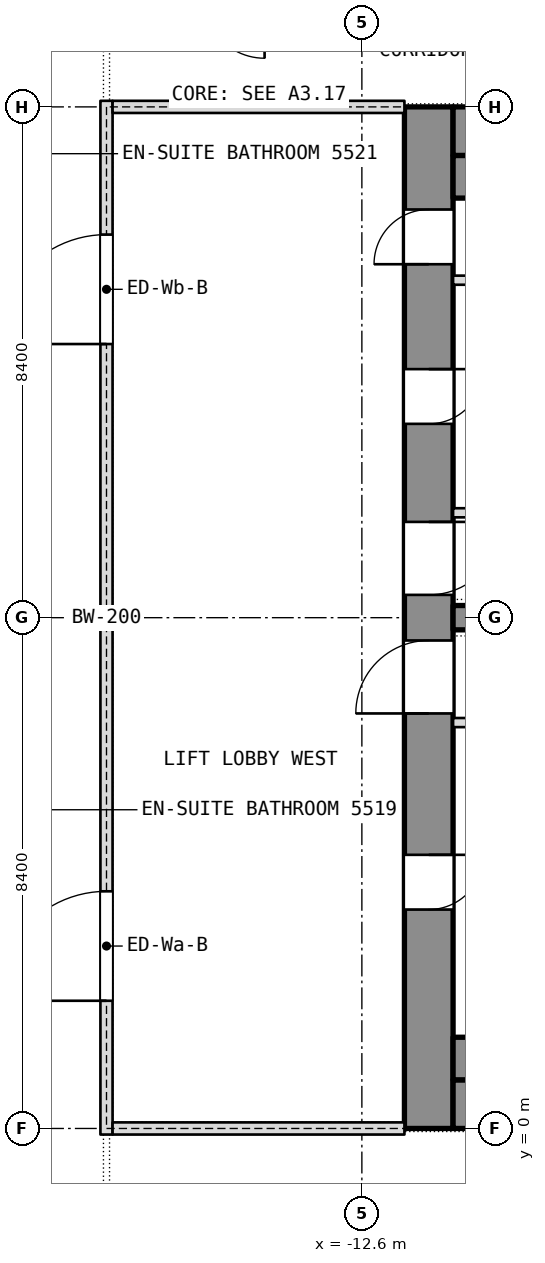
"""IFC4 building model, lengths in metres.
Left out: names, types, materials, properties, quantities, classifications, styles, units other than length and angle.
Written with IfcOpenShell. Run it as: python <this file> out.ifc"""

import sys

from ifc_helpers import new_model, si_unit, direction, frame, frame_2d, origin, place, context, subcontext, project, spatial, rectangle, extrude, element, fill, save


model = new_model("IFC4")
c1 = context("Model", 3, precision=1e-05, world=origin(), true_north=direction((0.0, 1.0)))
c2 = subcontext(c1, "Body", "Model", "MODEL_VIEW")
j1 = project(units=[si_unit("LENGTHUNIT", "METRE"), si_unit("PLANEANGLEUNIT", "RADIAN")], contexts=[c1])
p1 = place(None, origin())
s1 = spatial("IfcSite", under=j1, at=p1, CompositionType="ELEMENT")
p2 = place(p1, origin())
s2 = spatial("IfcBuilding", under=s1, at=p2, CompositionType="ELEMENT")
p3 = place(p2, frame((0.0, 0.0, 234.5)))
s3 = spatial("IfcBuildingStorey", under=s2, at=p3, CompositionType="ELEMENT", Elevation=234.5)
p4 = place(p3, frame((-11.5, 0.0, 0.0), z_axis=(0.0, 0.0, 1.0), x_axis=(0.0, 1.0, 0.0)))
e1 = element("IfcWall", 1, at=p4, inside=s3, PredefinedType="SHEAR", context=c2, shape_type="SweptSolid", body=[
    extrude(rectangle(XDim=16.8, YDim=0.8, at=frame_2d((8.4, 0.0))), origin(), (0.0, 0.0, 1.0), 3.6),
])
p5 = place(p4, frame((3.6, 0.0, 0.0)))
e2 = element("IfcOpeningElement", 2, at=p5, cuts=e1, PredefinedType="OPENING", context=c2, shape_type="SweptSolid", body=[
    extrude(rectangle(XDim=0.9, YDim=2.1, at=frame_2d((0.45, 1.05))), frame((0.0, 0.4, 0.0), z_axis=(0.0, -1.0, 0.0), x_axis=(1.0, 0.0, 0.0)), (0.0, 0.0, 1.0), 0.8),
])
p6 = place(p4, frame((6.825, 0.0, 0.0)))
e3 = element("IfcOpeningElement", 3, at=p6, cuts=e1, PredefinedType="OPENING", context=c2, shape_type="SweptSolid", body=[
    extrude(rectangle(XDim=1.2, YDim=2.1, at=frame_2d((0.6, 1.05))), frame((0.0, 0.4, 0.0), z_axis=(0.0, -1.0, 0.0), x_axis=(1.0, 0.0, 0.0)), (0.0, 0.0, 1.0), 0.8),
])
p7 = place(p4, frame((14.212, 0.0, 0.0)))
e4 = element("IfcOpeningElement", 4, at=p7, cuts=e1, PredefinedType="OPENING", context=c2, shape_type="SweptSolid", body=[
    extrude(rectangle(XDim=0.9, YDim=2.1, at=frame_2d((0.45, 1.05))), frame((0.0, 0.4, 0.0), z_axis=(0.0, -1.0, 0.0), x_axis=(1.0, 0.0, 0.0)), (0.0, 0.0, 1.0), 0.8),
])
p8 = place(p4, frame((11.587, 0.0, 0.0)))
e5 = element("IfcOpeningElement", 5, at=p8, cuts=e1, PredefinedType="OPENING", context=c2, shape_type="SweptSolid", body=[
    extrude(rectangle(XDim=0.9, YDim=2.1, at=frame_2d((0.45, 1.05))), frame((0.0, 0.4, 0.0), z_axis=(0.0, -1.0, 0.0), x_axis=(1.0, 0.0, 0.0)), (0.0, 0.0, 1.0), 0.8),
])
p9 = place(p4, frame((8.775, 0.0, 0.0)))
e6 = element("IfcOpeningElement", 6, at=p9, cuts=e1, PredefinedType="OPENING", context=c2, shape_type="SweptSolid", body=[
    extrude(rectangle(XDim=1.2, YDim=2.1, at=frame_2d((0.6, 1.05))), frame((0.0, 0.4, 0.0), z_axis=(0.0, -1.0, 0.0), x_axis=(1.0, 0.0, 0.0)), (0.0, 0.0, 1.0), 0.8),
])
for number, where, z_axis, x_axis in (
    (7, (-11.1, 0.4, 0.0), (0.0, 0.0, 1.0), (1.0, 0.0, 0.0)),
    (8, (-11.1, 16.4, 0.0), (0.0, 0.0, 1.0), (1.0, 0.0, 0.0)),
):
    element("IfcWall", number, at=place(p3, frame(where, z_axis=z_axis, x_axis=x_axis)), inside=s3, PredefinedType="SHEAR", context=c2, shape_type="SweptSolid", body=[
        extrude(rectangle(XDim=22.2, YDim=0.8, at=frame_2d((11.1, 0.0))), origin(), (0.0, 0.0, 1.0), 3.6),
    ])
p10 = place(p3, frame((-11.1, 8.4, 0.0), z_axis=(0.0, 0.0, 1.0), x_axis=(1.0, 0.0, 0.0)))
e9 = element("IfcWall", 9, at=p10, inside=s3, PredefinedType="SHEAR", context=c2, shape_type="SweptSolid", body=[
    extrude(rectangle(XDim=6.7, YDim=0.4, at=frame_2d((3.35, 0.0))), origin(), (0.0, 0.0, 1.0), 3.6),
])
for number, where, z_axis, x_axis in (
    (10, (-11.1, 1.15, 0.0), (0.0, 0.0, 1.0), (1.0, 0.0, 0.0)),
    (11, (-11.1, 15.65, 0.0), (0.0, 0.0, 1.0), (1.0, 0.0, 0.0)),
):
    element("IfcWall", number, at=place(p3, frame(where, z_axis=z_axis, x_axis=x_axis)), inside=s3, PredefinedType="PARTITIONING", context=c2, shape_type="SweptSolid", body=[
        extrude(rectangle(XDim=22.2, YDim=0.7, at=frame_2d((11.1, 0.0))), origin(), (0.0, 0.0, 1.0), 3.34),
    ])
for number, where, z_axis, x_axis in (
    (12, (-11.1, 6.675, 0.0), (0.0, 0.0, 1.0), (1.0, 0.0, 0.0)),
    (13, (-11.1, 10.125, 0.0), (0.0, 0.0, 1.0), (1.0, 0.0, 0.0)),
    (14, (-11.1, 13.95, 0.0), (0.0, 0.0, 1.0), (1.0, 0.0, 0.0)),
):
    element("IfcWall", number, at=place(p3, frame(where, z_axis=z_axis, x_axis=x_axis)), inside=s3, PredefinedType="PARTITIONING", context=c2, shape_type="SweptSolid", body=[
        extrude(rectangle(XDim=2.1, YDim=0.15, at=frame_2d((1.05, 0.0))), origin(), (0.0, 0.0, 1.0), 3.34),
    ])
p11 = place(p3, frame((-16.8, -0.1, 0.0), z_axis=(0.0, 0.0, 1.0), x_axis=(0.0, 1.0, 0.0)))
e15 = element("IfcWall", 15, at=p11, inside=s3, PredefinedType="PARTITIONING", context=c2, shape_type="SweptSolid", body=[
    extrude(rectangle(XDim=17.0, YDim=0.2, at=frame_2d((8.5, 0.0))), origin(), (0.0, 0.0, 1.0), 3.34),
])
p12 = place(p11, frame((2.2, 0.0, 0.0)))
e16 = element("IfcOpeningElement", 16, at=p12, cuts=e15, PredefinedType="OPENING", context=c2, shape_type="SweptSolid", body=[
    extrude(rectangle(XDim=1.8, YDim=2.1, at=frame_2d((0.9, 1.05))), frame((0.0, 0.1, 0.0), z_axis=(0.0, -1.0, 0.0), x_axis=(1.0, 0.0, 0.0)), (0.0, 0.0, 1.0), 0.2),
])
p13 = place(p11, frame((13.0, 0.0, 0.0)))
e17 = element("IfcOpeningElement", 17, at=p13, cuts=e15, PredefinedType="OPENING", context=c2, shape_type="SweptSolid", body=[
    extrude(rectangle(XDim=1.8, YDim=2.1, at=frame_2d((0.9, 1.05))), frame((0.0, 0.1, 0.0), z_axis=(0.0, -1.0, 0.0), x_axis=(1.0, 0.0, 0.0)), (0.0, 0.0, 1.0), 0.2),
])
for number, where, z_axis, x_axis in (
    (18, (-16.7, 0.0, 0.0), (0.0, 0.0, 1.0), (1.0, 0.0, 0.0)),
    (19, (-16.7, 16.8, 0.0), (0.0, 0.0, 1.0), (1.0, 0.0, 0.0)),
):
    element("IfcWall", number, at=place(p3, frame(where, z_axis=z_axis, x_axis=x_axis)), inside=s3, PredefinedType="PARTITIONING", context=c2, shape_type="SweptSolid", body=[
        extrude(rectangle(XDim=4.8, YDim=0.2, at=frame_2d((2.4, 0.0))), origin(), (0.0, 0.0, 1.0), 2.94),
    ])
p14 = place(p5, origin())
e20 = element("IfcDoor", 20, at=p14, inside=s3, OperationType="SINGLE_SWING_LEFT", PredefinedType="DOOR", context=c2, shape_type="SweptSolid", body=[
    extrude(rectangle(XDim=0.9, YDim=2.1, at=frame_2d((0.45, 1.05))), frame((0.0, 0.025, 0.0), z_axis=(0.0, -1.0, 0.0), x_axis=(1.0, 0.0, 0.0)), (0.0, 0.0, 1.0), 0.05),
])
fill(e2, e20)
p15 = place(p6, origin())
e21 = element("IfcDoor", 21, at=p15, inside=s3, OperationType="SINGLE_SWING_LEFT", PredefinedType="DOOR", context=c2, shape_type="SweptSolid", body=[
    extrude(rectangle(XDim=1.2, YDim=2.1, at=frame_2d((0.6, 1.05))), frame((0.0, 0.025, 0.0), z_axis=(0.0, -1.0, 0.0), x_axis=(1.0, 0.0, 0.0)), (0.0, 0.0, 1.0), 0.05),
])
fill(e3, e21)
p16 = place(p7, origin())
e22 = element("IfcDoor", 22, at=p16, inside=s3, OperationType="SINGLE_SWING_LEFT", PredefinedType="DOOR", context=c2, shape_type="SweptSolid", body=[
    extrude(rectangle(XDim=0.9, YDim=2.1, at=frame_2d((0.45, 1.05))), frame((0.0, 0.025, 0.0), z_axis=(0.0, -1.0, 0.0), x_axis=(1.0, 0.0, 0.0)), (0.0, 0.0, 1.0), 0.05),
])
fill(e4, e22)
p17 = place(p8, origin())
e23 = element("IfcDoor", 23, at=p17, inside=s3, OperationType="SINGLE_SWING_LEFT", PredefinedType="DOOR", context=c2, shape_type="SweptSolid", body=[
    extrude(rectangle(XDim=0.9, YDim=2.1, at=frame_2d((0.45, 1.05))), frame((0.0, 0.025, 0.0), z_axis=(0.0, -1.0, 0.0), x_axis=(1.0, 0.0, 0.0)), (0.0, 0.0, 1.0), 0.05),
])
fill(e5, e23)
p18 = place(p9, origin())
e24 = element("IfcDoor", 24, at=p18, inside=s3, OperationType="SINGLE_SWING_LEFT", PredefinedType="DOOR", context=c2, shape_type="SweptSolid", body=[
    extrude(rectangle(XDim=1.2, YDim=2.1, at=frame_2d((0.6, 1.05))), frame((0.0, 0.025, 0.0), z_axis=(0.0, -1.0, 0.0), x_axis=(1.0, 0.0, 0.0)), (0.0, 0.0, 1.0), 0.05),
])
fill(e6, e24)
p19 = place(p12, origin())
e25 = element("IfcDoor", 25, at=p19, inside=s3, OperationType="DOUBLE_DOOR_SINGLE_SWING", PredefinedType="DOOR", context=c2, shape_type="SweptSolid", body=[
    extrude(rectangle(XDim=1.8, YDim=2.1, at=frame_2d((0.9, 1.05))), frame((0.0, 0.025, 0.0), z_axis=(0.0, -1.0, 0.0), x_axis=(1.0, 0.0, 0.0)), (0.0, 0.0, 1.0), 0.05),
])
fill(e16, e25)
p20 = place(p13, origin())
e26 = element("IfcDoor", 26, at=p20, inside=s3, OperationType="DOUBLE_DOOR_SINGLE_SWING", PredefinedType="DOOR", context=c2, shape_type="SweptSolid", body=[
    extrude(rectangle(XDim=1.8, YDim=2.1, at=frame_2d((0.9, 1.05))), frame((0.0, 0.025, 0.0), z_axis=(0.0, -1.0, 0.0), x_axis=(1.0, 0.0, 0.0)), (0.0, 0.0, 1.0), 0.05),
])
fill(e17, e26)
save(model, sys.argv[1])
